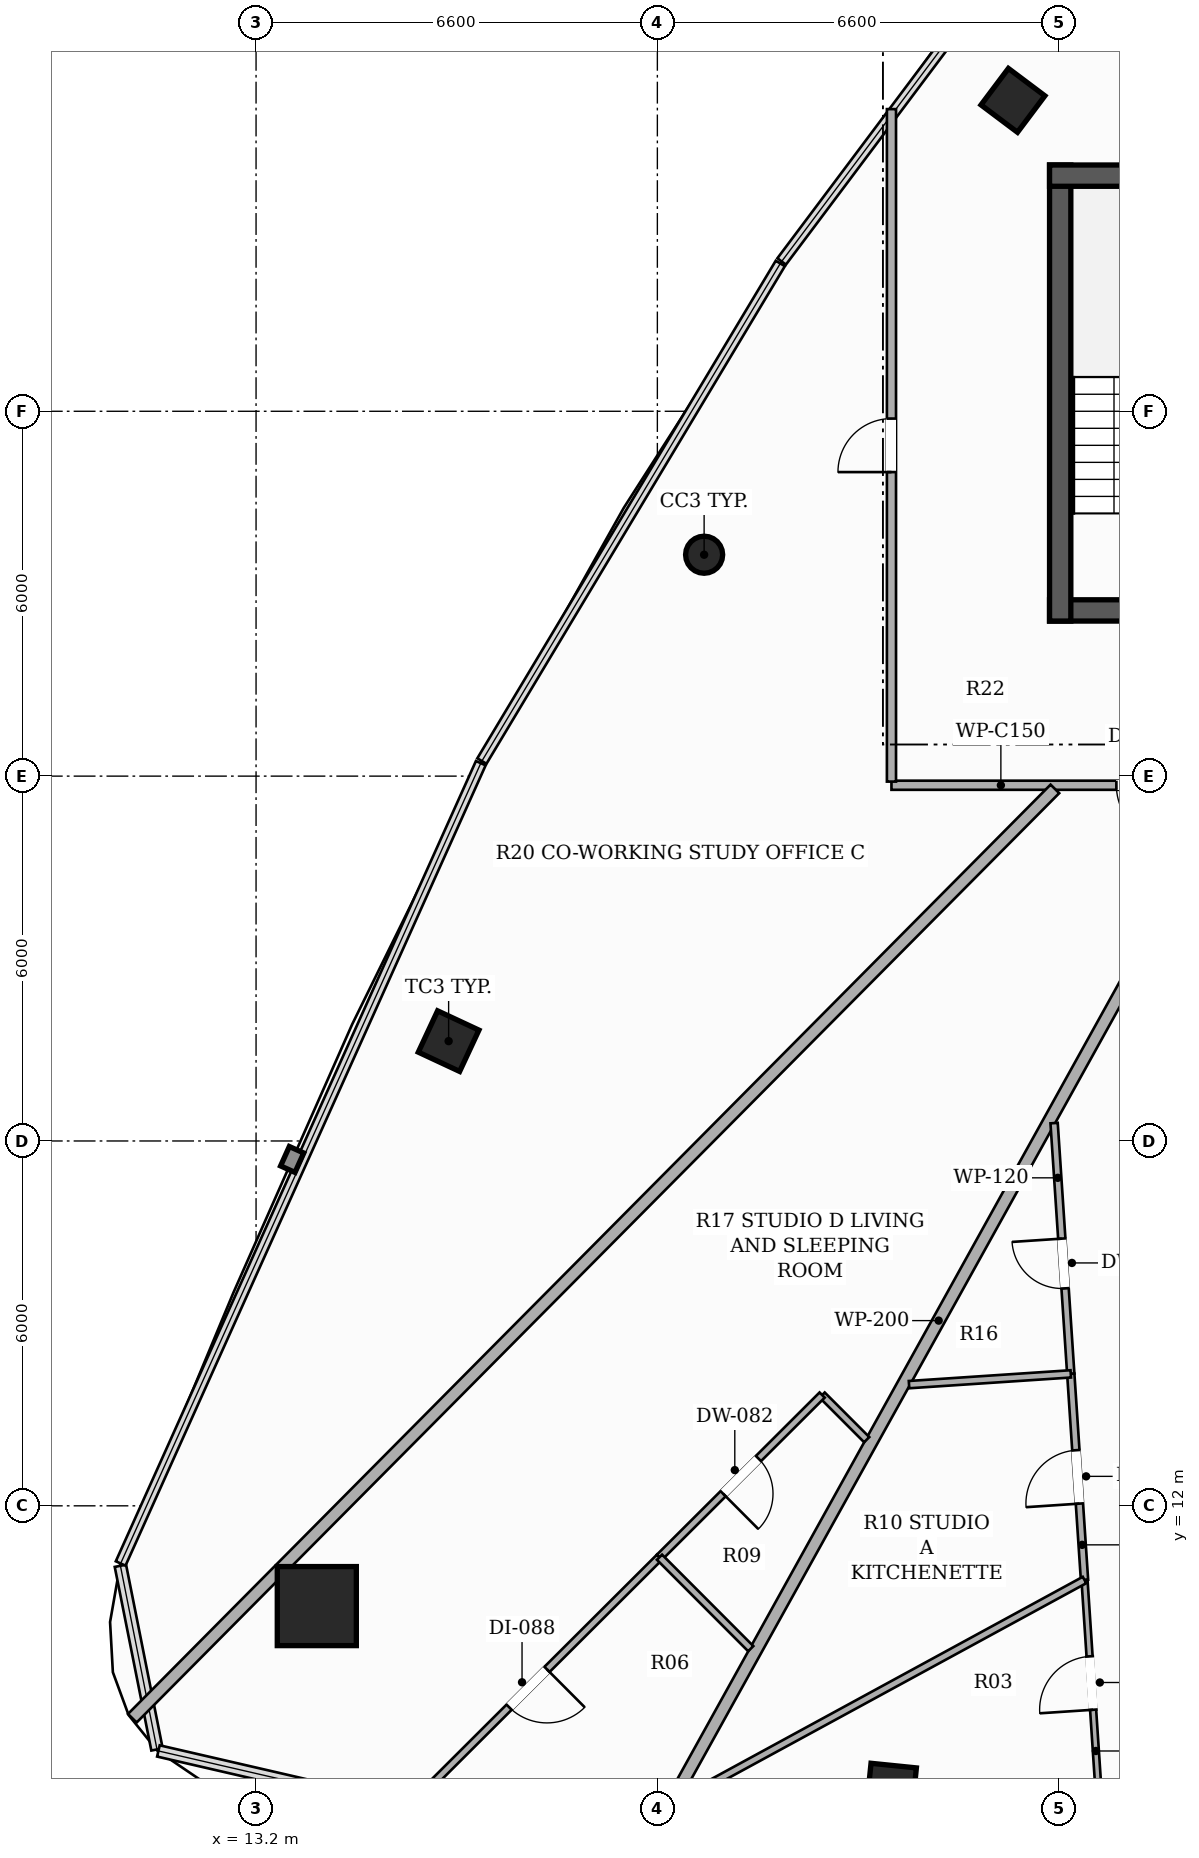
"""IFC4 building model, lengths in metres.
Left out: names, types, materials, properties, quantities, classifications, styles, units other than length and angle.
Written with IfcOpenShell. Run it as: python <this file> out.ifc"""

import sys

from ifc_helpers import new_model, si_unit, direction, frame, frame_2d, origin, origin_2d, place, context, subcontext, project, spatial, rectangle, hollow_rectangle, hollow_circle, extrude, element, fill, save


model = new_model("IFC4")
c1 = context("Model", 3, precision=1e-05, world=origin(), true_north=direction((0.0, 1.0)))
c2 = subcontext(c1, "Body", "Model", "MODEL_VIEW")
j1 = project(units=[si_unit("LENGTHUNIT", "METRE"), si_unit("PLANEANGLEUNIT", "RADIAN")], contexts=[c1])
p1 = place(None, origin())
s1 = spatial("IfcSite", under=j1, at=p1, CompositionType="ELEMENT")
p2 = place(p1, origin())
s2 = spatial("IfcBuilding", under=s1, at=p2, CompositionType="ELEMENT")
p3 = place(p2, frame((0.0, 0.0, 253.55)))
s3 = spatial("IfcBuildingStorey", under=s2, at=p3, CompositionType="ELEMENT", Elevation=253.55)
p4 = place(p3, frame((26.25, 26.725, 0.0), z_axis=(0.0, 0.0, 1.0), x_axis=(1.0, 0.0, 0.0)))
e1 = element("IfcWall", 1, at=p4, inside=s3, PredefinedType="SHEAR", context=c2, shape_type="SweptSolid", body=[
    extrude(rectangle(XDim=13.5, YDim=0.35, at=frame_2d((6.75, 0.0))), origin(), (0.0, 0.0, 1.0), 3.3),
])
p5 = place(p4, frame((4.35, 0.0, 0.0)))
e2 = element("IfcOpeningElement", 2, at=p5, cuts=e1, PredefinedType="OPENING", context=c2, shape_type="SweptSolid", body=[
    extrude(rectangle(XDim=1.05, YDim=2.15, at=frame_2d((0.525, 1.075))), frame((0.0, 0.185, 0.0), z_axis=(0.0, -1.0, 0.0), x_axis=(1.0, 0.0, 0.0)), (0.0, 0.0, 1.0), 0.37),
])
p6 = place(p4, frame((8.3, 0.0, 0.0)))
e3 = element("IfcOpeningElement", 3, at=p6, cuts=e1, PredefinedType="OPENING", context=c2, shape_type="SweptSolid", body=[
    extrude(rectangle(XDim=1.05, YDim=2.15, at=frame_2d((0.525, 1.075))), frame((0.0, 0.185, 0.0), z_axis=(0.0, -1.0, 0.0), x_axis=(1.0, 0.0, 0.0)), (0.0, 0.0, 1.0), 0.37),
])
p7 = place(p3, frame((26.425, 26.55, 0.0), z_axis=(0.0, 0.0, 1.0), x_axis=(0.0, 1.0, 0.0)))
e4 = element("IfcWall", 4, at=p7, inside=s3, PredefinedType="SHEAR", context=c2, shape_type="SweptSolid", body=[
    extrude(rectangle(XDim=7.5, YDim=0.35, at=frame_2d((3.75, 0.0))), origin(), (0.0, 0.0, 1.0), 3.3),
])
p8 = place(p3, frame((26.25, 33.875, 0.0), z_axis=(0.0, 0.0, 1.0), x_axis=(1.0, 0.0, 0.0)))
e5 = element("IfcWall", 5, at=p8, inside=s3, PredefinedType="SHEAR", context=c2, shape_type="SweptSolid", body=[
    extrude(rectangle(XDim=3.6, YDim=0.35, at=frame_2d((1.8, 0.0))), origin(), (0.0, 0.0, 1.0), 3.3),
])
p9 = place(p3, frame((14.199, 10.351, 0.0), z_axis=(0.0, 0.0, 1.0), x_axis=(1.0, 0.0, 0.0)))
e6 = element("IfcColumn", 6, at=p9, inside=s3, PredefinedType="COLUMN", context=c2, shape_type="SweptSolid", body=[
    extrude(hollow_rectangle(XDim=1.3, YDim=1.3, WallThickness=0.04, at=origin_2d()), origin(), (0.0, 0.0, 1.0), 3.3),
])
p10 = place(p3, frame((25.648, 35.113, 0.0), z_axis=(0.0, 0.0, 1.0), x_axis=(0.600420225326, 0.799684658487, 0.0)))
e7 = element("IfcColumn", 7, at=p10, inside=s3, PredefinedType="COLUMN", context=c2, shape_type="SweptSolid", body=[
    extrude(hollow_rectangle(XDim=0.75, YDim=0.75, WallThickness=0.025, at=origin_2d()), origin(), (0.0, 0.0, 1.0), 3.3),
])
p11 = place(p3, frame((20.569, 27.641, 0.0), z_axis=(0.0, 0.0, 1.0), x_axis=(1.0, 0.0, 0.0)))
e8 = element("IfcColumn", 8, at=p11, inside=s3, PredefinedType="COLUMN", context=c2, shape_type="SweptSolid", body=[
    extrude(hollow_circle(Radius=0.305, WallThickness=0.016, at=origin_2d()), origin(), (0.0, 0.0, 1.0), 3.3),
])
for number, where, z_axis, x_axis in (
    (9, (16.367, 19.642, 0.0), (0.0, 0.0, 1.0), (0.423, 0.906, 0.0)),
    (10, (23.649, 7.355, 0.0), (0.0, 0.0, 1.0), (-0.995, 0.101, 0.0)),
):
    element("IfcColumn", number, at=place(p3, frame(where, z_axis=z_axis, x_axis=x_axis)), inside=s3, PredefinedType="COLUMN", context=c2, shape_type="SweptSolid", body=[
        extrude(hollow_rectangle(XDim=0.75, YDim=0.75, WallThickness=0.025, at=origin_2d()), origin(), (0.0, 0.0, 1.0), 3.3),
    ])
p12 = place(p3, frame((32.165, 23.85, 0.0), z_axis=(0.0, 0.0, 1.0), x_axis=(-1.0, 0.0, 0.0)))
e11 = element("IfcWall", 11, at=p12, inside=s3, PredefinedType="PARTITIONING", context=c2, shape_type="SweptSolid", body=[
    extrude(rectangle(XDim=8.515, YDim=0.15, at=frame_2d((4.258, 0.0))), origin(), (0.0, 0.0, 1.0), 2.405),
])
p13 = place(p12, frame((1.133, 0.0, 0.0)))
e12 = element("IfcOpeningElement", 12, at=p13, cuts=e11, PredefinedType="OPENING", context=c2, shape_type="SweptSolid", body=[
    extrude(rectangle(XDim=0.92, YDim=2.15, at=frame_2d((0.46, 1.075))), frame((0.0, 0.085, 0.0), z_axis=(0.0, -1.0, 0.0), x_axis=(1.0, 0.0, 0.0)), (0.0, 0.0, 1.0), 0.17),
])
p14 = place(p12, frame((3.896, 0.0, 0.0)))
e13 = element("IfcOpeningElement", 13, at=p14, cuts=e11, PredefinedType="OPENING", context=c2, shape_type="SweptSolid", body=[
    extrude(rectangle(XDim=0.92, YDim=2.15, at=frame_2d((0.46, 1.075))), frame((0.0, 0.085, 0.0), z_axis=(0.0, -1.0, 0.0), x_axis=(1.0, 0.0, 0.0)), (0.0, 0.0, 1.0), 0.17),
])
p15 = place(p3, frame((23.65, 23.91, 0.0), z_axis=(0.0, 0.0, 1.0), x_axis=(0.0, 1.0, 0.0)))
e14 = element("IfcWall", 14, at=p15, inside=s3, PredefinedType="PARTITIONING", context=c2, shape_type="SweptSolid", body=[
    extrude(rectangle(XDim=11.059, YDim=0.15, at=frame_2d((5.53, 0.0))), origin(), (0.0, 0.0, 1.0), 2.332),
])
p16 = place(p15, frame((5.09, 0.0, 0.0)))
e15 = element("IfcOpeningElement", 15, at=p16, cuts=e14, PredefinedType="OPENING", context=c2, shape_type="SweptSolid", body=[
    extrude(rectangle(XDim=0.88, YDim=2.1, at=frame_2d((0.44, 1.05))), frame((0.0, 0.085, 0.0), z_axis=(0.0, -1.0, 0.0), x_axis=(1.0, 0.0, 0.0)), (0.0, 0.0, 1.0), 0.17),
])
p17 = place(p3, frame((19.575, 6.302, 0.0), z_axis=(0.0, 0.0, 1.0), x_axis=(0.485129783088, 0.874442161358, 0.0)))
e16 = element("IfcWall", 16, at=p17, inside=s3, PredefinedType="PARTITIONING", context=c2, shape_type="SweptSolid", body=[
    extrude(rectangle(XDim=19.999, YDim=0.2, at=frame_2d((10.0, 0.0))), origin(), (0.0, 0.0, 1.0), 2.332),
])
p18 = place(p3, frame((26.338, 23.79, 0.0), z_axis=(0.0, 0.0, 1.0), x_axis=(-0.70454576136, -0.70965855885, 0.0)))
e17 = element("IfcWall", 17, at=p18, inside=s3, PredefinedType="PARTITIONING", context=c2, shape_type="SweptSolid", body=[
    extrude(rectangle(XDim=21.536, YDim=0.2, at=frame_2d((10.768, 0.0))), origin(), (0.0, 0.0, 1.0), 2.332),
])
p19 = place(p3, frame((26.599, 14.17, 0.0), z_axis=(0.0, 0.0, 1.0), x_axis=(-0.066334744758, 0.997797425151, 0.0)))
e18 = element("IfcWall", 18, at=p19, inside=s3, PredefinedType="PARTITIONING", context=c2, shape_type="SweptSolid", body=[
    extrude(rectangle(XDim=4.133, YDim=0.12, at=frame_2d((2.066, 0.0))), origin(), (0.0, 0.0, 1.0), 2.613),
])
p20 = place(p19, frame((1.409, 0.0, 0.0)))
e19 = element("IfcOpeningElement", 19, at=p20, cuts=e18, PredefinedType="OPENING", context=c2, shape_type="SweptSolid", body=[
    extrude(rectangle(XDim=0.82, YDim=2.1, at=frame_2d((0.41, 1.05))), frame((0.0, 0.07, 0.0), z_axis=(0.0, -1.0, 0.0), x_axis=(1.0, 0.0, 0.0)), (0.0, 0.0, 1.0), 0.14),
])
p21 = place(p3, frame((26.825, 10.78, 0.0), z_axis=(0.0, 0.0, 1.0), x_axis=(-0.066471315173, 0.997788336402, 0.0)))
e20 = element("IfcWall", 20, at=p21, inside=s3, PredefinedType="PARTITIONING", context=c2, shape_type="SweptSolid", body=[
    extrude(rectangle(XDim=3.397, YDim=0.12, at=frame_2d((1.699, 0.0))), origin(), (0.0, 0.0, 1.0), 2.9),
])
p22 = place(p21, frame((1.259, 0.0, 0.0)))
e21 = element("IfcOpeningElement", 21, at=p22, cuts=e20, PredefinedType="OPENING", context=c2, shape_type="SweptSolid", body=[
    extrude(rectangle(XDim=0.88, YDim=2.1, at=frame_2d((0.44, 1.05))), frame((0.0, 0.07, 0.0), z_axis=(0.0, -1.0, 0.0), x_axis=(1.0, 0.0, 0.0)), (0.0, 0.0, 1.0), 0.14),
])
p23 = place(p3, frame((37.877, 8.11, 0.0), z_axis=(0.0, 0.0, 1.0), x_axis=(-0.997794804299, -0.066374155471, 0.0)))
e22 = element("IfcWall", 22, at=p23, inside=s3, PredefinedType="PARTITIONING", context=c2, shape_type="SweptSolid", body=[
    extrude(rectangle(XDim=10.851, YDim=0.1, at=frame_2d((5.425, 0.0))), origin(), (0.0, 0.0, 1.0), 2.332),
])
p24 = place(p23, frame((5.68, 0.0, 0.0)))
e23 = element("IfcOpeningElement", 23, at=p24, cuts=e22, PredefinedType="OPENING", context=c2, shape_type="SweptSolid", body=[
    extrude(rectangle(XDim=0.88, YDim=2.1, at=frame_2d((0.44, 1.05))), frame((0.0, 0.06, 0.0), z_axis=(0.0, -1.0, 0.0), x_axis=(1.0, 0.0, 0.0)), (0.0, 0.0, 1.0), 0.12),
])
p25 = place(p3, frame((27.05, 7.39, 0.0), z_axis=(0.0, 0.0, 1.0), x_axis=(-0.066251929929, 0.997802927326, 0.0)))
e24 = element("IfcWall", 24, at=p25, inside=s3, PredefinedType="PARTITIONING", context=c2, shape_type="SweptSolid", body=[
    extrude(rectangle(XDim=3.398, YDim=0.1, at=frame_2d((1.699, 0.0))), origin(), (0.0, 0.0, 1.0), 2.332),
])
p26 = place(p25, frame((1.259, 0.0, 0.0)))
e25 = element("IfcOpeningElement", 25, at=p26, cuts=e24, PredefinedType="OPENING", context=c2, shape_type="SweptSolid", body=[
    extrude(rectangle(XDim=0.88, YDim=2.1, at=frame_2d((0.44, 1.05))), frame((0.0, 0.06, 0.0), z_axis=(0.0, -1.0, 0.0), x_axis=(1.0, 0.0, 0.0)), (0.0, 0.0, 1.0), 0.12),
])
p27 = place(p3, frame((26.599, 14.17, 0.0), z_axis=(0.0, 0.0, 1.0), x_axis=(-0.99779365881, -0.066391373223, 0.0)))
e26 = element("IfcWall", 26, at=p27, inside=s3, PredefinedType="PARTITIONING", context=c2, shape_type="SweptSolid", body=[
    extrude(rectangle(XDim=2.666, YDim=0.12, at=frame_2d((1.333, 0.0))), origin(), (0.0, 0.0, 1.0), 2.613),
])
p28 = place(p3, frame((26.825, 10.78, 0.0), z_axis=(0.0, 0.0, 1.0), x_axis=(-0.87825059366, -0.478200684583, 0.0)))
e27 = element("IfcWall", 27, at=p28, inside=s3, PredefinedType="PARTITIONING", context=c2, shape_type="SweptSolid", body=[
    extrude(rectangle(XDim=7.616, YDim=0.12, at=frame_2d((3.808, 0.0))), origin(), (0.0, 0.0, 1.0), 2.332),
])
p29 = place(p3, frame((23.243, 13.088, 0.0), z_axis=(0.0, 0.0, 1.0), x_axis=(-0.706518163511, 0.707694909286, 0.0)))
e28 = element("IfcWall", 28, at=p29, inside=s3, PredefinedType="PARTITIONING", context=c2, shape_type="SweptSolid", body=[
    extrude(rectangle(XDim=1.037, YDim=0.12, at=frame_2d((0.519, 0.0))), origin(), (0.0, 0.0, 1.0), 2.9),
])
p30 = place(p3, frame((22.51, 13.822, 0.0), z_axis=(0.0, 0.0, 1.0), x_axis=(-0.708172404385, -0.706039549649, 0.0)))
e29 = element("IfcWall", 29, at=p30, inside=s3, PredefinedType="PARTITIONING", context=c2, shape_type="SweptSolid", body=[
    extrude(rectangle(XDim=3.777, YDim=0.12, at=frame_2d((1.889, 0.0))), origin(), (0.0, 0.0, 1.0), 2.613),
])
p31 = place(p30, frame((1.479, 0.0, 0.0)))
e30 = element("IfcOpeningElement", 30, at=p31, cuts=e29, PredefinedType="OPENING", context=c2, shape_type="SweptSolid", body=[
    extrude(rectangle(XDim=0.82, YDim=2.1, at=frame_2d((0.41, 1.05))), frame((0.0, 0.07, 0.0), z_axis=(0.0, -1.0, 0.0), x_axis=(1.0, 0.0, 0.0)), (0.0, 0.0, 1.0), 0.14),
])
p32 = place(p3, frame((19.835, 11.155, 0.0), z_axis=(0.0, 0.0, 1.0), x_axis=(-0.708085833798, -0.706126371108, 0.0)))
e31 = element("IfcWall", 31, at=p32, inside=s3, PredefinedType="PARTITIONING", context=c2, shape_type="SweptSolid", body=[
    extrude(rectangle(XDim=6.105, YDim=0.12, at=frame_2d((3.053, 0.0))), origin(), (0.0, 0.0, 1.0), 2.332),
])
p33 = place(p32, frame((2.613, 0.0, 0.0)))
e32 = element("IfcOpeningElement", 32, at=p33, cuts=e31, PredefinedType="OPENING", context=c2, shape_type="SweptSolid", body=[
    extrude(rectangle(XDim=0.88, YDim=2.1, at=frame_2d((0.44, 1.05))), frame((0.0, 0.07, 0.0), z_axis=(0.0, -1.0, 0.0), x_axis=(1.0, 0.0, 0.0)), (0.0, 0.0, 1.0), 0.14),
])
p34 = place(p3, frame((21.336, 9.651, 0.0), z_axis=(0.0, 0.0, 1.0), x_axis=(-0.70635958505, 0.707853188597, 0.0)))
e33 = element("IfcWall", 33, at=p34, inside=s3, PredefinedType="PARTITIONING", context=c2, shape_type="SweptSolid", body=[
    extrude(rectangle(XDim=2.125, YDim=0.12, at=frame_2d((1.062, 0.0))), origin(), (0.0, 0.0, 1.0), 2.613),
])
p35 = place(p20, origin())
e34 = element("IfcDoor", 34, at=p35, inside=s3, OperationType="SINGLE_SWING_RIGHT", PredefinedType="DOOR", context=c2, shape_type="SweptSolid", body=[
    extrude(rectangle(XDim=0.82, YDim=2.1, at=frame_2d((0.41, 1.05))), frame((0.0, 0.025, 0.0), z_axis=(0.0, -1.0, 0.0), x_axis=(1.0, 0.0, 0.0)), (0.0, 0.0, 1.0), 0.05),
])
fill(e19, e34)
p36 = place(p22, origin())
e35 = element("IfcDoor", 35, at=p36, inside=s3, OperationType="SINGLE_SWING_LEFT", PredefinedType="DOOR", context=c2, shape_type="SweptSolid", body=[
    extrude(rectangle(XDim=0.88, YDim=2.1, at=frame_2d((0.44, 1.05))), frame((0.0, 0.025, 0.0), z_axis=(0.0, -1.0, 0.0), x_axis=(1.0, 0.0, 0.0)), (0.0, 0.0, 1.0), 0.05),
])
fill(e21, e35)
p37 = place(p26, origin())
e36 = element("IfcDoor", 36, at=p37, inside=s3, OperationType="SINGLE_SWING_LEFT", PredefinedType="DOOR", context=c2, shape_type="SweptSolid", body=[
    extrude(rectangle(XDim=0.88, YDim=2.1, at=frame_2d((0.44, 1.05))), frame((0.0, 0.025, 0.0), z_axis=(0.0, -1.0, 0.0), x_axis=(1.0, 0.0, 0.0)), (0.0, 0.0, 1.0), 0.05),
])
fill(e25, e36)
p38 = place(p16, origin())
e37 = element("IfcDoor", 37, at=p38, inside=s3, OperationType="SINGLE_SWING_LEFT", PredefinedType="DOOR", context=c2, shape_type="SweptSolid", body=[
    extrude(rectangle(XDim=0.88, YDim=2.1, at=frame_2d((0.44, 1.05))), frame((0.0, 0.025, 0.0), z_axis=(0.0, -1.0, 0.0), x_axis=(1.0, 0.0, 0.0)), (0.0, 0.0, 1.0), 0.05),
])
fill(e15, e37)
p39 = place(p14, origin())
e38 = element("IfcDoor", 38, at=p39, inside=s3, OperationType="SINGLE_SWING_LEFT", PredefinedType="DOOR", context=c2, shape_type="SweptSolid", body=[
    extrude(rectangle(XDim=0.92, YDim=2.15, at=frame_2d((0.46, 1.075))), frame((0.0, 0.025, 0.0), z_axis=(0.0, -1.0, 0.0), x_axis=(1.0, 0.0, 0.0)), (0.0, 0.0, 1.0), 0.05),
])
fill(e13, e38)
p40 = place(p31, origin())
e39 = element("IfcDoor", 39, at=p40, inside=s3, OperationType="SINGLE_SWING_RIGHT", PredefinedType="DOOR", context=c2, shape_type="SweptSolid", body=[
    extrude(rectangle(XDim=0.82, YDim=2.1, at=frame_2d((0.41, 1.05))), frame((0.0, 0.025, 0.0), z_axis=(0.0, -1.0, 0.0), x_axis=(1.0, 0.0, 0.0)), (0.0, 0.0, 1.0), 0.05),
])
fill(e30, e39)
p41 = place(p33, origin())
e40 = element("IfcDoor", 40, at=p41, inside=s3, OperationType="SINGLE_SWING_LEFT", PredefinedType="DOOR", context=c2, shape_type="SweptSolid", body=[
    extrude(rectangle(XDim=0.88, YDim=2.1, at=frame_2d((0.44, 1.05))), frame((0.0, 0.025, 0.0), z_axis=(0.0, -1.0, 0.0), x_axis=(1.0, 0.0, 0.0)), (0.0, 0.0, 1.0), 0.05),
])
fill(e32, e40)
save(model, sys.argv[1])
